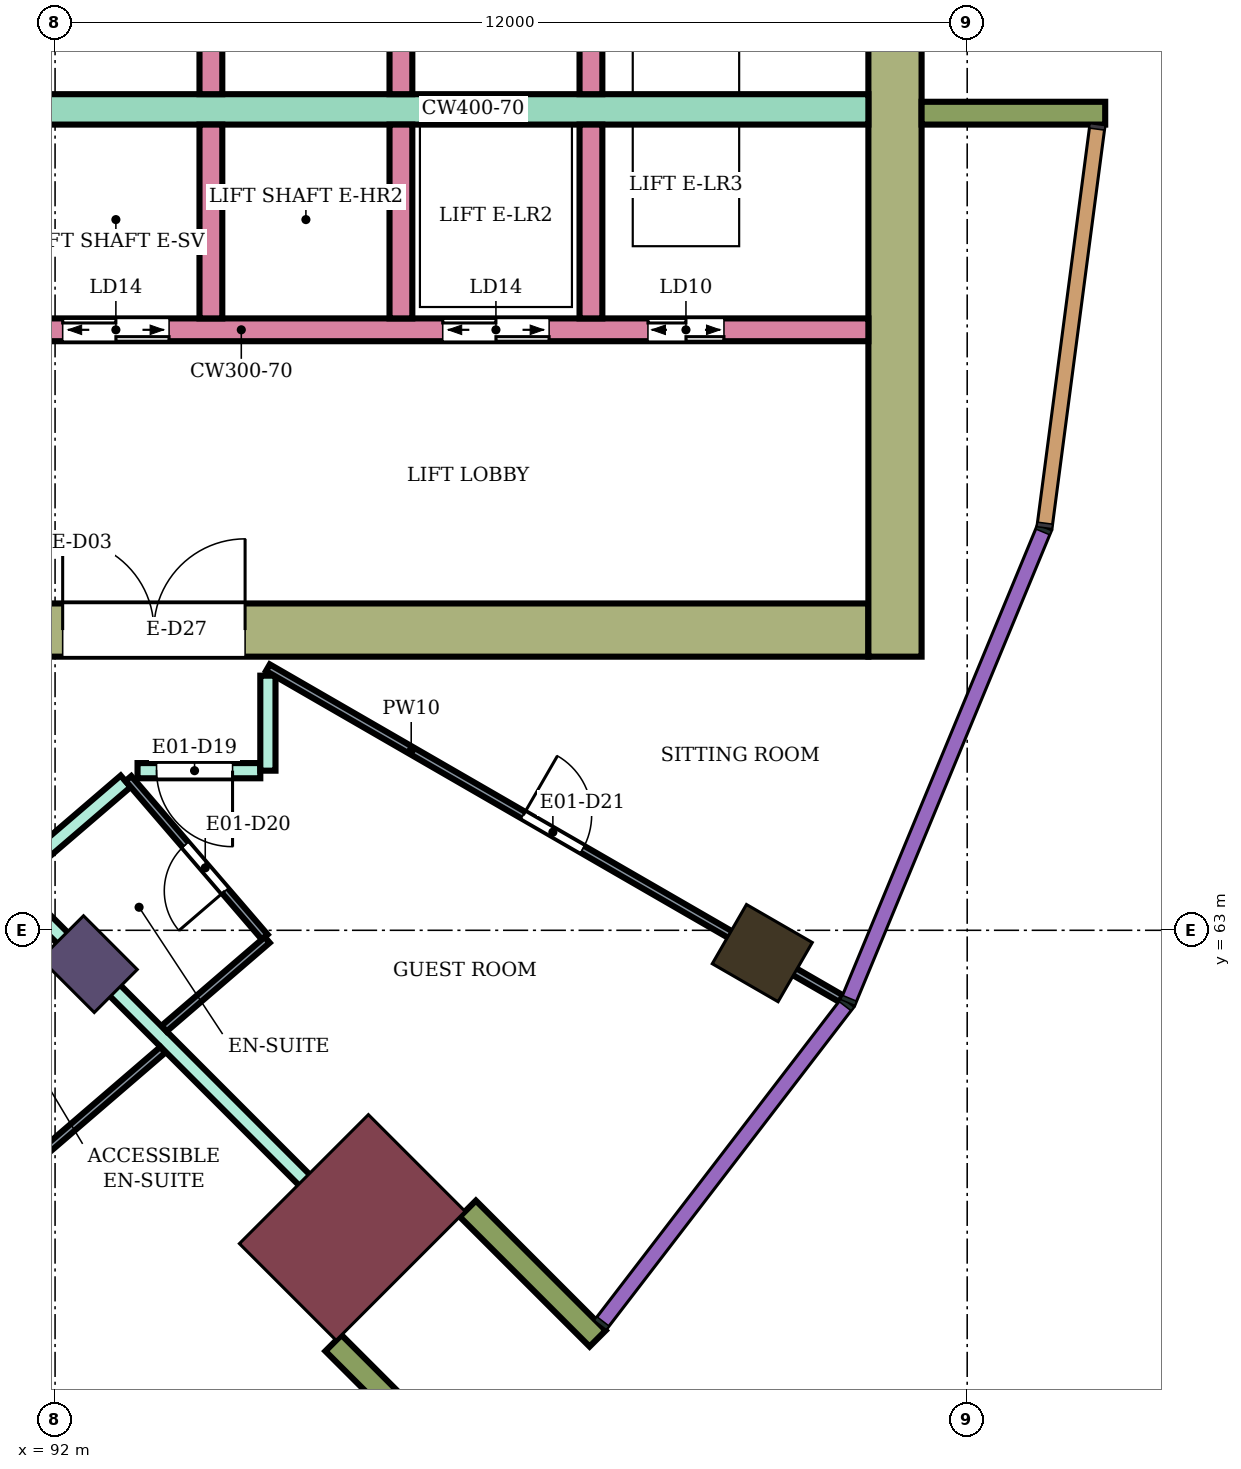
"""IFC4 building model, lengths in metres.
Left out: names, types, materials, properties, quantities, classifications, styles, units other than length and angle.
Written with IfcOpenShell. Run it as: python <this file> out.ifc"""

import sys

from ifc_helpers import new_model, si_unit, direction, frame, frame_2d, origin, origin_2d, place, context, subcontext, project, spatial, rectangle, extrude, element, fill, save


model = new_model("IFC4")
c1 = context("Model", 3, precision=1e-05, world=origin(), true_north=direction((0.0, 1.0)))
c2 = subcontext(c1, "Body", "Model", "MODEL_VIEW")
j1 = project(units=[si_unit("LENGTHUNIT", "METRE"), si_unit("PLANEANGLEUNIT", "RADIAN")], contexts=[c1])
p1 = place(None, origin())
s1 = spatial("IfcSite", under=j1, at=p1, CompositionType="ELEMENT")
p2 = place(p1, origin())
s2 = spatial("IfcBuilding", under=s1, at=p2, CompositionType="ELEMENT")
p3 = place(p2, frame((0.0, 0.0, 114.6)))
s3 = spatial("IfcBuildingStorey", under=s2, at=p3, CompositionType="ELEMENT", Elevation=114.6)
p4 = place(p3, frame((101.304, 62.7, 0.0), z_axis=(0.0, 0.0, 1.0), x_axis=(0.866025403784, -0.5, 0.0)))
e1 = element("IfcColumn", 1, at=p4, inside=s3, PredefinedType="COLUMN", context=c2, shape_type="SweptSolid", body=[
    extrude(rectangle(XDim=1.0, YDim=0.9, at=origin_2d()), origin(), (0.0, 0.0, 1.0), 3.9),
])
p5 = place(p3, frame((92.445, 62.555, 0.0), z_axis=(0.0, 0.0, 1.0), x_axis=(0.707106781187, -0.707106781187, 0.0)))
e2 = element("IfcColumn", 2, at=p5, inside=s3, PredefinedType="COLUMN", context=c2, shape_type="SweptSolid", body=[
    extrude(rectangle(XDim=1.0, YDim=0.8, at=origin_2d()), origin(), (0.0, 0.0, 1.0), 3.9),
])
p6 = place(p3, frame((95.91, 59.09, 0.0), z_axis=(0.0, 0.0, 1.0), x_axis=(0.707106781187, -0.707106781187, 0.0)))
e3 = element("IfcColumn", 3, at=p6, inside=s3, PredefinedType="COLUMN", context=c2, shape_type="SweptSolid", body=[
    extrude(rectangle(XDim=1.8, YDim=2.4, at=origin_2d()), origin(), (0.0, 0.0, 1.0), 3.9),
])
p7 = place(p3, frame((87.9, 66.95, 0.0), z_axis=(0.0, 0.0, 1.0), x_axis=(1.0, 0.0, 0.0)))
e4 = element("IfcWall", 4, at=p7, inside=s3, PredefinedType="SHEAR", context=c2, shape_type="SweptSolid", body=[
    extrude(rectangle(XDim=14.8, YDim=0.7, at=frame_2d((7.4, 0.0))), origin(), (0.0, 0.0, 1.0), 3.58),
])
p8 = place(p7, frame((4.2, 0.0, 0.0)))
e5 = element("IfcOpeningElement", 5, at=p8, cuts=e4, PredefinedType="OPENING", context=c2, shape_type="SweptSolid", body=[
    extrude(rectangle(XDim=2.4, YDim=2.4, at=frame_2d((1.2, 1.2))), frame((0.0, 0.36, 0.0), z_axis=(0.0, -1.0, 0.0), x_axis=(1.0, 0.0, 0.0)), (0.0, 0.0, 1.0), 0.72),
])
p9 = place(p3, frame((103.05, 66.6, 0.0), z_axis=(0.0, 0.0, 1.0), x_axis=(0.0, 1.0, 0.0)))
e6 = element("IfcWall", 6, at=p9, inside=s3, PredefinedType="SHEAR", context=c2, shape_type="SweptSolid", body=[
    extrude(rectangle(XDim=16.8, YDim=0.7, at=frame_2d((8.4, 0.0))), origin(), (0.0, 0.0, 1.0), 3.58),
])
p10 = place(p3, frame((91.7, 73.8, 0.0), z_axis=(0.0, 0.0, 1.0), x_axis=(1.0, 0.0, 0.0)))
e7 = element("IfcWall", 7, at=p10, inside=s3, PredefinedType="SHEAR", context=c2, shape_type="SweptSolid", body=[
    extrude(rectangle(XDim=11.0, YDim=0.4, at=frame_2d((5.5, 0.0))), origin(), (0.0, 0.0, 1.0), 3.58),
])
p11 = place(p3, frame((91.7, 70.9, 0.0), z_axis=(0.0, 0.0, 1.0), x_axis=(1.0, 0.0, 0.0)))
e8 = element("IfcWall", 8, at=p11, inside=s3, PredefinedType="SHEAR", context=c2, shape_type="SweptSolid", body=[
    extrude(rectangle(XDim=11.0, YDim=0.3, at=frame_2d((5.5, 0.0))), origin(), (0.0, 0.0, 1.0), 3.58),
])
p12 = place(p11, frame((0.4, 0.0, 0.0)))
e9 = element("IfcOpeningElement", 9, at=p12, cuts=e8, PredefinedType="OPENING", context=c2, shape_type="SweptSolid", body=[
    extrude(rectangle(XDim=1.4, YDim=2.1, at=frame_2d((0.7, 1.05))), frame((0.0, 0.16, 0.0), z_axis=(0.0, -1.0, 0.0), x_axis=(1.0, 0.0, 0.0)), (0.0, 0.0, 1.0), 0.32),
])
p13 = place(p11, frame((5.4, 0.0, 0.0)))
e10 = element("IfcOpeningElement", 10, at=p13, cuts=e8, PredefinedType="OPENING", context=c2, shape_type="SweptSolid", body=[
    extrude(rectangle(XDim=1.4, YDim=2.1, at=frame_2d((0.7, 1.05))), frame((0.0, 0.16, 0.0), z_axis=(0.0, -1.0, 0.0), x_axis=(1.0, 0.0, 0.0)), (0.0, 0.0, 1.0), 0.32),
])
p14 = place(p11, frame((8.1, 0.0, 0.0)))
e11 = element("IfcOpeningElement", 11, at=p14, cuts=e8, PredefinedType="OPENING", context=c2, shape_type="SweptSolid", body=[
    extrude(rectangle(XDim=1.0, YDim=2.1, at=frame_2d((0.5, 1.05))), frame((0.0, 0.16, 0.0), z_axis=(0.0, -1.0, 0.0), x_axis=(1.0, 0.0, 0.0)), (0.0, 0.0, 1.0), 0.32),
])
for number, where, z_axis, x_axis in (
    (12, (94.05, 74.0, 0.0), (0.0, 0.0, 1.0), (0.0, 1.0, 0.0)),
    (13, (96.55, 74.0, 0.0), (0.0, 0.0, 1.0), (0.0, 1.0, 0.0)),
    (14, (99.05, 74.0, 0.0), (0.0, 0.0, 1.0), (0.0, 1.0, 0.0)),
    (15, (94.05, 71.05, 0.0), (0.0, 0.0, 1.0), (0.0, 1.0, 0.0)),
    (16, (96.55, 71.05, 0.0), (0.0, 0.0, 1.0), (0.0, 1.0, 0.0)),
    (17, (99.05, 71.05, 0.0), (0.0, 0.0, 1.0), (0.0, 1.0, 0.0)),
):
    element("IfcWall", number, at=place(p3, frame(where, z_axis=z_axis, x_axis=x_axis)), inside=s3, PredefinedType="SHEAR", context=c2, shape_type="SweptSolid", body=[
        extrude(rectangle(XDim=2.55, YDim=0.3, at=frame_2d((1.275, 0.0))), origin(), (0.0, 0.0, 1.0), 3.58),
    ])
for number, where, z_axis, x_axis in (
    (18, (103.4, 73.75, 0.0), (0.0, 0.0, 1.0), (1.0, 0.0, 0.0)),
    (19, (95.662, 57.57, 0.0), (0.0, 0.0, 1.0), (0.707, -0.707, 0.0)),
    (20, (97.43, 59.338, 0.0), (0.0, 0.0, 1.0), (0.707, -0.707, 0.0)),
):
    element("IfcWall", number, at=place(p3, frame(where, z_axis=z_axis, x_axis=x_axis)), inside=s3, PredefinedType="NOTDEFINED", context=c2, shape_type="SweptSolid", body=[
        extrude(rectangle(XDim=2.416, YDim=0.3, at=frame_2d((1.208, 0.0))), origin(), (0.0, 0.0, 1.0), 3.9),
    ])
p15 = place(p3, frame((88.235, 60.931, 0.0), z_axis=(0.0, 0.0, 1.0), x_axis=(0.758816241808, 0.651304775945, 0.0)))
e21 = element("IfcWall", 21, at=p15, inside=s3, PredefinedType="PARTITIONING", context=c2, shape_type="SweptSolid", body=[
    extrude(rectangle(XDim=6.186, YDim=0.2, at=frame_2d((3.093, 0.0))), origin(), (0.0, 0.0, 1.0), 3.45),
])
p16 = place(p15, frame((0.308, 0.0, 0.0)))
e22 = element("IfcOpeningElement", 22, at=p16, cuts=e21, PredefinedType="OPENING", context=c2, shape_type="SweptSolid", body=[
    extrude(rectangle(XDim=1.1, YDim=2.1, at=frame_2d((0.55, 1.05))), frame((0.0, 0.11, 0.0), z_axis=(0.0, -1.0, 0.0), x_axis=(1.0, 0.0, 0.0)), (0.0, 0.0, 1.0), 0.22),
])
p17 = place(p3, frame((88.159, 60.863, 0.0), z_axis=(0.0, 0.0, 1.0), x_axis=(0.499935840196, -0.866062443296, 0.0)))
e23 = element("IfcWall", 23, at=p17, inside=s3, PredefinedType="PARTITIONING", context=c2, shape_type="SweptSolid", body=[
    extrude(rectangle(XDim=9.475, YDim=0.2, at=frame_2d((4.737, 0.0))), origin(), (0.0, 0.0, 1.0), 3.45),
])
p18 = place(p3, frame((91.449, 63.548, 0.0), z_axis=(0.0, 0.0, 1.0), x_axis=(0.706984804638, -0.707228736698, 0.0)))
e24 = element("IfcWall", 24, at=p18, inside=s3, PredefinedType="PARTITIONING", context=c2, shape_type="SweptSolid", body=[
    extrude(rectangle(XDim=7.006, YDim=0.2, at=frame_2d((3.503, 0.0))), origin(), (0.0, 0.0, 1.0), 3.45),
])
p19 = place(p3, frame((93.085, 65.1, 0.0), z_axis=(0.0, 0.0, 1.0), x_axis=(1.0, 0.0, 0.0)))
e25 = element("IfcWall", 25, at=p19, inside=s3, PredefinedType="PARTITIONING", context=c2, shape_type="SweptSolid", body=[
    extrude(rectangle(XDim=1.615, YDim=0.2, at=frame_2d((0.808, 0.0))), origin(), (0.0, 0.0, 1.0), 3.45),
])
p20 = place(p19, frame((0.25, 0.0, 0.0)))
e26 = element("IfcOpeningElement", 26, at=p20, cuts=e25, PredefinedType="OPENING", context=c2, shape_type="SweptSolid", body=[
    extrude(rectangle(XDim=1.0, YDim=2.1, at=frame_2d((0.5, 1.05))), frame((0.0, 0.11, 0.0), z_axis=(0.0, -1.0, 0.0), x_axis=(1.0, 0.0, 0.0)), (0.0, 0.0, 1.0), 0.22),
])
p21 = place(p3, frame((94.8, 65.1, 0.0), z_axis=(0.0, 0.0, 1.0), x_axis=(0.0, 1.0, 0.0)))
e27 = element("IfcWall", 27, at=p21, inside=s3, PredefinedType="PARTITIONING", context=c2, shape_type="SweptSolid", body=[
    extrude(rectangle(XDim=1.25, YDim=0.2, at=frame_2d((0.625, 0.0))), origin(), (0.0, 0.0, 1.0), 3.45),
])
p22 = place(p3, frame((91.434, 59.722, 0.0), z_axis=(0.0, 0.0, 1.0), x_axis=(0.758076316785, 0.652165851552, 0.0)))
e28 = element("IfcWall", 28, at=p22, inside=s3, PredefinedType="PARTITIONING", context=c2, shape_type="SweptSolid", body=[
    extrude(rectangle(XDim=2.616, YDim=0.1, at=frame_2d((1.308, 0.0))), origin(), (0.0, 0.0, 1.0), 3.45),
])
p23 = place(p3, frame((92.965, 64.997, 0.0), z_axis=(0.0, 0.0, 1.0), x_axis=(0.652069888227, -0.758158862553, 0.0)))
e29 = element("IfcWall", 29, at=p23, inside=s3, PredefinedType="PARTITIONING", context=c2, shape_type="SweptSolid", body=[
    extrude(rectangle(XDim=2.75, YDim=0.1, at=frame_2d((1.375, 0.0))), origin(), (0.0, 0.0, 1.0), 3.45),
])
p24 = place(p23, frame((1.15, 0.0, 0.0)))
e30 = element("IfcOpeningElement", 30, at=p24, cuts=e29, PredefinedType="OPENING", context=c2, shape_type="SweptSolid", body=[
    extrude(rectangle(XDim=0.8, YDim=2.1, at=frame_2d((0.4, 1.05))), frame((0.0, 0.06, 0.0), z_axis=(0.0, -1.0, 0.0), x_axis=(1.0, 0.0, 0.0)), (0.0, 0.0, 1.0), 0.12),
])
p25 = place(p3, frame((93.435, 61.707, 0.0), z_axis=(0.0, 0.0, 1.0), x_axis=(0.758070495124, 0.652172618578, 0.0)))
e31 = element("IfcWall", 31, at=p25, inside=s3, PredefinedType="PARTITIONING", context=c2, shape_type="SweptSolid", body=[
    extrude(rectangle(XDim=1.789, YDim=0.1, at=frame_2d((0.895, 0.0))), origin(), (0.0, 0.0, 1.0), 3.45),
])
p26 = place(p3, frame((94.8, 66.455, 0.0), z_axis=(0.0, 0.0, 1.0), x_axis=(0.86602264145, -0.500004784474, 0.0)))
e32 = element("IfcWall", 32, at=p26, inside=s3, PredefinedType="PARTITIONING", context=c2, shape_type="SweptSolid", body=[
    extrude(rectangle(XDim=8.708, YDim=0.1, at=frame_2d((4.354, 0.0))), origin(), (0.0, 0.0, 1.0), 3.45),
])
p27 = place(p26, frame((3.879, 0.0, 0.0)))
e33 = element("IfcOpeningElement", 33, at=p27, cuts=e32, PredefinedType="OPENING", context=c2, shape_type="SweptSolid", body=[
    extrude(rectangle(XDim=0.9, YDim=2.1, at=frame_2d((0.45, 1.05))), frame((0.0, 0.06, 0.0), z_axis=(0.0, -1.0, 0.0), x_axis=(1.0, 0.0, 0.0)), (0.0, 0.0, 1.0), 0.12),
])
p28 = place(p20, frame((1.0, 0.0, 0.0), z_axis=(0.0, 0.0, 1.0), x_axis=(-1.0, 0.0, 0.0)))
e34 = element("IfcDoor", 34, at=p28, inside=s3, OperationType="SINGLE_SWING_LEFT", PredefinedType="DOOR", context=c2, shape_type="SweptSolid", body=[
    extrude(rectangle(XDim=1.0, YDim=2.1, at=frame_2d((0.5, 1.05))), frame((0.0, 0.025, 0.0), z_axis=(0.0, -1.0, 0.0), x_axis=(1.0, 0.0, 0.0)), (0.0, 0.0, 1.0), 0.05),
])
fill(e26, e34)
p29 = place(p24, frame((0.8, 0.0, 0.0), z_axis=(0.0, 0.0, 1.0), x_axis=(-1.0, 0.0, 0.0)))
e35 = element("IfcDoor", 35, at=p29, inside=s3, OperationType="SINGLE_SWING_LEFT", PredefinedType="DOOR", context=c2, shape_type="SweptSolid", body=[
    extrude(rectangle(XDim=0.8, YDim=2.1, at=frame_2d((0.4, 1.05))), frame((0.0, 0.025, 0.0), z_axis=(0.0, -1.0, 0.0), x_axis=(1.0, 0.0, 0.0)), (0.0, 0.0, 1.0), 0.05),
])
fill(e30, e35)
p30 = place(p27, origin())
e36 = element("IfcDoor", 36, at=p30, inside=s3, OperationType="SINGLE_SWING_LEFT", PredefinedType="DOOR", context=c2, shape_type="SweptSolid", body=[
    extrude(rectangle(XDim=0.9, YDim=2.1, at=frame_2d((0.45, 1.05))), frame((0.0, 0.025, 0.0), z_axis=(0.0, -1.0, 0.0), x_axis=(1.0, 0.0, 0.0)), (0.0, 0.0, 1.0), 0.05),
])
fill(e33, e36)
p31 = place(p12, origin())
e37 = element("IfcDoor", 37, at=p31, inside=s3, OperationType="DOUBLE_DOOR_SLIDING", PredefinedType="DOOR", context=c2, shape_type="SweptSolid", body=[
    extrude(rectangle(XDim=1.4, YDim=2.1, at=frame_2d((0.7, 1.05))), frame((0.0, 0.025, 0.0), z_axis=(0.0, -1.0, 0.0), x_axis=(1.0, 0.0, 0.0)), (0.0, 0.0, 1.0), 0.05),
])
fill(e9, e37)
p32 = place(p13, origin())
e38 = element("IfcDoor", 38, at=p32, inside=s3, OperationType="DOUBLE_DOOR_SLIDING", PredefinedType="DOOR", context=c2, shape_type="SweptSolid", body=[
    extrude(rectangle(XDim=1.4, YDim=2.1, at=frame_2d((0.7, 1.05))), frame((0.0, 0.025, 0.0), z_axis=(0.0, -1.0, 0.0), x_axis=(1.0, 0.0, 0.0)), (0.0, 0.0, 1.0), 0.05),
])
fill(e10, e38)
p33 = place(p14, origin())
e39 = element("IfcDoor", 39, at=p33, inside=s3, OperationType="DOUBLE_DOOR_SLIDING", PredefinedType="DOOR", context=c2, shape_type="SweptSolid", body=[
    extrude(rectangle(XDim=1.0, YDim=2.1, at=frame_2d((0.5, 1.05))), frame((0.0, 0.025, 0.0), z_axis=(0.0, -1.0, 0.0), x_axis=(1.0, 0.0, 0.0)), (0.0, 0.0, 1.0), 0.05),
])
fill(e11, e39)
p34 = place(p8, origin())
e40 = element("IfcDoor", 40, at=p34, inside=s3, OperationType="DOUBLE_DOOR_SINGLE_SWING", PredefinedType="DOOR", context=c2, shape_type="SweptSolid", body=[
    extrude(rectangle(XDim=2.4, YDim=2.4, at=frame_2d((1.2, 1.2))), frame((0.0, 0.025, 0.0), z_axis=(0.0, -1.0, 0.0), x_axis=(1.0, 0.0, 0.0)), (0.0, 0.0, 1.0), 0.05),
])
fill(e5, e40)
save(model, sys.argv[1])
